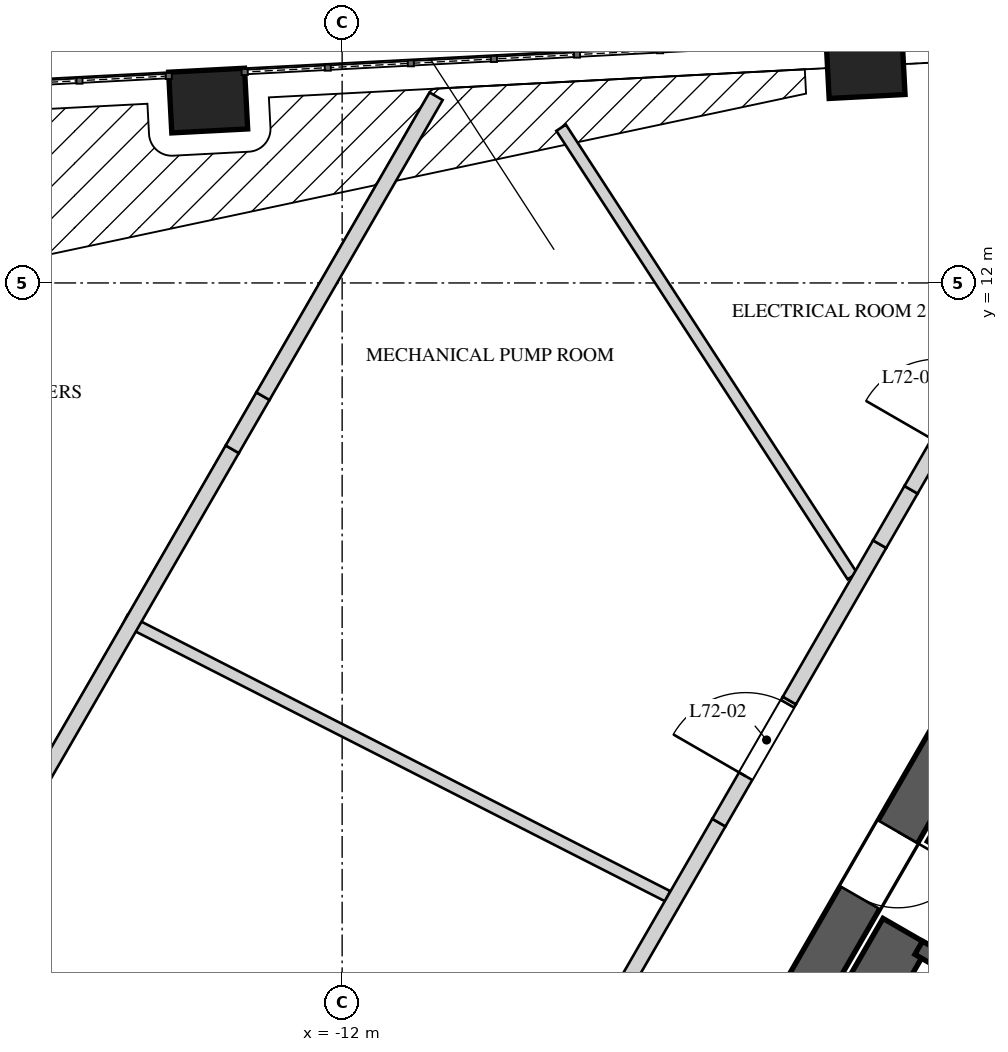
"""IFC4 building model, lengths in metres.
Left out: names, types, materials, properties, quantities, classifications, styles, units other than length and angle.
Written with IfcOpenShell. Run it as: python <this file> out.ifc"""

import sys

from ifc_helpers import new_model, si_unit, direction, frame, frame_2d, origin, origin_2d, place, context, subcontext, project, spatial, polyline, rectangle, outline, extrude, element, fill, save


model = new_model("IFC4")
c1 = context("Model", 3, precision=1e-05, world=origin(), true_north=direction((0.0, 1.0)))
c2 = subcontext(c1, "Body", "Model", "MODEL_VIEW")
j1 = project(units=[si_unit("LENGTHUNIT", "METRE"), si_unit("PLANEANGLEUNIT", "RADIAN")], contexts=[c1])
p1 = place(None, origin())
s1 = spatial("IfcSite", under=j1, at=p1, CompositionType="ELEMENT")
p2 = place(p1, origin())
s2 = spatial("IfcBuilding", under=s1, at=p2, CompositionType="ELEMENT")
p3 = place(p2, frame((0.0, 0.0, 306.4)))
s3 = spatial("IfcBuildingStorey", under=s2, at=p3, CompositionType="ELEMENT", Elevation=306.4)
p4 = place(p3, frame((-1.27, 10.7, 0.0), z_axis=(0.0, 0.0, 1.0), x_axis=(-0.499999536116, -0.866025671608, 0.0)))
e1 = element("IfcWall", 1, at=p4, inside=s3, PredefinedType="SHEAR", context=c2, shape_type="SweptSolid", body=[
    extrude(rectangle(XDim=17.263, YDim=0.6, at=frame_2d((8.631, 0.0))), origin(), (0.0, 0.0, 1.0), 14.0),
])
p5 = place(p4, frame((6.836, 0.0, 0.0)))
e2 = element("IfcOpeningElement", 2, at=p5, cuts=e1, PredefinedType="OPENING", context=c2, shape_type="SweptSolid", body=[
    extrude(rectangle(XDim=1.0, YDim=2.4, at=frame_2d((0.5, 1.2))), frame((0.0, 0.31, 0.0), z_axis=(0.0, -1.0, 0.0), x_axis=(1.0, 0.0, 0.0)), (0.0, 0.0, 1.0), 0.62),
])
for number, where, z_axis, x_axis in (
    (3, (-5.115, 14.853, 0.0), (0.0, 0.0, 1.0), (-0.999, -0.052, 0.0)),
    (4, (-13.763, 14.399, 0.0), (0.0, 0.0, 1.0), (-0.999, -0.052, 0.0)),
):
    element("IfcColumn", number, at=place(p3, frame(where, z_axis=z_axis, x_axis=x_axis)), inside=s3, PredefinedType="COLUMN", context=c2, shape_type="SweptSolid", body=[
        extrude(rectangle(XDim=1.0, YDim=0.8, at=origin_2d()), origin(), (0.0, 0.0, 1.0), 9.037),
    ])
p6 = place(p3, frame((-0.896, 9.847, 0.0), z_axis=(0.0, 0.0, 1.0), x_axis=(-0.500009909098, -0.866019682689, 0.0)))
e5 = element("IfcWall", 5, at=p6, inside=s3, PredefinedType="SOLIDWALL", context=c2, shape_type="SweptSolid", body=[
    extrude(rectangle(XDim=6.2, YDim=0.7, at=frame_2d((3.1, 0.0))), origin(), (0.0, 0.0, 1.0), 13.65),
])
p7 = place(p3, frame((-4.581, 3.465, 0.0), z_axis=(0.0, 0.0, 1.0), x_axis=(-0.499996545922, -0.866027397988, 0.0)))
e6 = element("IfcWall", 6, at=p7, inside=s3, PredefinedType="SOLIDWALL", context=c2, shape_type="SweptSolid", body=[
    extrude(rectangle(XDim=5.5, YDim=0.7, at=frame_2d((2.75, 0.0))), origin(), (0.0, 0.0, 1.0), 13.65),
])
p8 = place(p3, frame((-2.38, 2.078, 0.0), z_axis=(0.0, 0.0, 1.0), x_axis=(-0.866061024631, 0.499938297808, 0.0)))
e7 = element("IfcWall", 7, at=p8, inside=s3, PredefinedType="SOLIDWALL", context=c2, shape_type="SweptSolid", body=[
    extrude(rectangle(XDim=2.35, YDim=0.2, at=frame_2d((1.175, 0.0))), origin(), (0.0, 0.0, 1.0), 13.65),
])
p9 = place(p3, frame((-7.718, 3.932, 0.0), z_axis=(0.0, 0.0, 1.0), x_axis=(-0.891006469539, 0.453990606995, 0.0)))
e8 = element("IfcWall", 8, at=p9, inside=s3, PredefinedType="PARTITIONING", context=c2, shape_type="SweptSolid", body=[
    extrude(rectangle(XDim=8.011, YDim=0.15, at=frame_2d((4.005, 0.0))), origin(), (0.0, 0.0, 1.0), 13.65),
])
p10 = place(p3, frame((-5.287, 8.142, 0.0), z_axis=(0.0, 0.0, 1.0), x_axis=(-0.544633340221, 0.83867426616, 0.0)))
e9 = element("IfcWall", 9, at=p10, inside=s3, PredefinedType="PARTITIONING", context=c2, shape_type="SweptSolid", body=[
    extrude(rectangle(XDim=7.035, YDim=0.15, at=frame_2d((3.518, 0.0))), origin(), (0.0, 0.0, 1.0), 13.65),
])
p11 = place(p3, frame((-9.819, 0.094, 0.0), z_axis=(0.0, 0.0, 1.0), x_axis=(0.499971228071, 0.866042014628, 0.0)))
e10 = element("IfcWall", 10, at=p11, inside=s3, PredefinedType="SOLIDWALL", context=c2, shape_type="SweptSolid", body=[
    extrude(rectangle(XDim=5.55, YDim=0.2, at=frame_2d((2.775, 0.0))), origin(), (0.0, 0.0, 1.0), 13.65),
])
p12 = place(p11, frame((1.243, 0.0, 0.0)))
e11 = element("IfcOpeningElement", 11, at=p12, cuts=e10, PredefinedType="OPENING", context=c2, shape_type="SweptSolid", body=[
    extrude(rectangle(XDim=1.1, YDim=2.2, at=frame_2d((0.55, 1.1))), frame((0.0, 0.11, 0.0), z_axis=(0.0, -1.0, 0.0), x_axis=(1.0, 0.0, 0.0)), (0.0, 0.0, 1.0), 0.22),
])
p13 = place(p3, frame((-7.044, 4.9, 0.0), z_axis=(0.0, 0.0, 1.0), x_axis=(0.500045188778, 0.865999312459, 0.0)))
e12 = element("IfcWall", 12, at=p13, inside=s3, PredefinedType="SOLIDWALL", context=c2, shape_type="SweptSolid", body=[
    extrude(outline(polyline([(0.0, 0.0), (1.855, 0.0), (1.855, 13.65), (0.807, 13.65), (0.807, 12.75), (0.0, 12.75), (0.0, 0.0)])), frame((0.0, 0.1, 0.0), z_axis=(0.0, -1.0, 0.0), x_axis=(1.0, 0.0, 0.0)), (0.0, 0.0, 1.0), 0.2),
])
p14 = place(p13, frame((0.705, 0.0, 0.0)))
e13 = element("IfcOpeningElement", 13, at=p14, cuts=e12, PredefinedType="OPENING", context=c2, shape_type="SweptSolid", body=[
    extrude(rectangle(XDim=1.1, YDim=2.2, at=frame_2d((0.55, 1.1))), frame((0.0, 0.11, 0.0), z_axis=(0.0, -1.0, 0.0), x_axis=(1.0, 0.0, 0.0)), (0.0, 0.0, 1.0), 0.22),
])
p15 = place(p3, frame((-6.116, 6.507, 0.0), z_axis=(0.0, 0.0, 1.0), x_axis=(0.499998356159, 0.866026352854, 0.0)))
e14 = element("IfcWall", 14, at=p15, inside=s3, PredefinedType="SOLIDWALL", context=c2, shape_type="SweptSolid", body=[
    extrude(rectangle(XDim=2.375, YDim=0.2, at=frame_2d((1.187, 0.0))), origin(), (0.0, 0.0, 1.0), 13.65),
])
p16 = place(p3, frame((-4.929, 8.563, 0.0), z_axis=(0.0, 0.0, 1.0), x_axis=(0.500046299512, 0.865998671098, 0.0)))
e15 = element("IfcWall", 15, at=p16, inside=s3, PredefinedType="SOLIDWALL", context=c2, shape_type="SweptSolid", body=[
    extrude(rectangle(XDim=0.827, YDim=0.2, at=frame_2d((0.413, 0.0))), origin(), (0.0, 0.0, 1.0), 12.95),
])
p17 = place(p3, frame((-4.515, 9.279, 0.0), z_axis=(0.0, 0.0, 1.0), x_axis=(0.499975428181, 0.866039589866, 0.0)))
e16 = element("IfcWall", 16, at=p17, inside=s3, PredefinedType="SOLIDWALL", context=c2, shape_type="SweptSolid", body=[
    extrude(rectangle(XDim=4.066, YDim=0.2, at=frame_2d((2.033, 0.0))), origin(), (0.0, 0.0, 1.0), 13.65),
])
p18 = place(p17, frame((0.717, 0.0, 0.0)))
e17 = element("IfcOpeningElement", 17, at=p18, cuts=e16, PredefinedType="OPENING", context=c2, shape_type="SweptSolid", body=[
    extrude(rectangle(XDim=1.1, YDim=2.2, at=frame_2d((0.55, 1.1))), frame((0.0, 0.11, 0.0), z_axis=(0.0, -1.0, 0.0), x_axis=(1.0, 0.0, 0.0)), (0.0, 0.0, 1.0), 0.22),
])
p19 = place(p3, frame((-18.534, 0.999, 0.0), z_axis=(0.0, 0.0, 1.0), x_axis=(0.500022177915, 0.866012598981, 0.0)))
e18 = element("IfcWall", 18, at=p19, inside=s3, PredefinedType="SOLIDWALL", context=c2, shape_type="SweptSolid", body=[
    extrude(rectangle(XDim=10.177, YDim=0.2, at=frame_2d((5.088, 0.0))), origin(), (0.0, 0.0, 1.0), 13.65),
])
p20 = place(p19, frame((3.227, 0.0, 0.0)))
e19 = element("IfcOpeningElement", 19, at=p20, cuts=e18, PredefinedType="OPENING", context=c2, shape_type="SweptSolid", body=[
    extrude(rectangle(XDim=1.6, YDim=2.3, at=frame_2d((0.8, 1.15))), frame((0.0, 0.11, 0.0), z_axis=(0.0, -1.0, 0.0), x_axis=(1.0, 0.0, 0.0)), (0.0, 0.0, 1.0), 0.22),
])
p21 = place(p3, frame((-13.445, 9.812, 0.0), z_axis=(0.0, 0.0, 1.0), x_axis=(0.499783563124, 0.866150327617, 0.0)))
e20 = element("IfcWall", 20, at=p21, inside=s3, PredefinedType="SOLIDWALL", context=c2, shape_type="SweptSolid", body=[
    extrude(rectangle(XDim=0.807, YDim=0.2, at=frame_2d((0.403, 0.0))), origin(), (0.0, 0.0, 1.0), 12.75),
])
p22 = place(p3, frame((-13.042, 10.511, 0.0), z_axis=(0.0, 0.0, 1.0), x_axis=(0.49999457255, 0.866028537301, 0.0)))
e21 = element("IfcWall", 21, at=p22, inside=s3, PredefinedType="SOLIDWALL", context=c2, shape_type="SweptSolid", body=[
    extrude(rectangle(XDim=4.556, YDim=0.2, at=frame_2d((2.278, 0.0))), origin(), (0.0, 0.0, 1.0), 13.65),
])
p23 = place(p5, origin())
e22 = element("IfcDoor", 22, at=p23, inside=s3, OperationType="SINGLE_SWING_RIGHT", PredefinedType="DOOR", context=c2, shape_type="SweptSolid", body=[
    extrude(rectangle(XDim=1.0, YDim=2.4, at=frame_2d((0.5, 1.2))), frame((0.0, 0.025, 0.0), z_axis=(0.0, -1.0, 0.0), x_axis=(1.0, 0.0, 0.0)), (0.0, 0.0, 1.0), 0.05),
])
fill(e2, e22)
p24 = place(p14, origin())
e23 = element("IfcDoor", 23, at=p24, inside=s3, OperationType="SINGLE_SWING_RIGHT", PredefinedType="DOOR", context=c2, shape_type="SweptSolid", body=[
    extrude(rectangle(XDim=1.1, YDim=2.2, at=frame_2d((0.55, 1.1))), frame((0.0, 0.025, 0.0), z_axis=(0.0, -1.0, 0.0), x_axis=(1.0, 0.0, 0.0)), (0.0, 0.0, 1.0), 0.05),
])
fill(e13, e23)
save(model, sys.argv[1])
